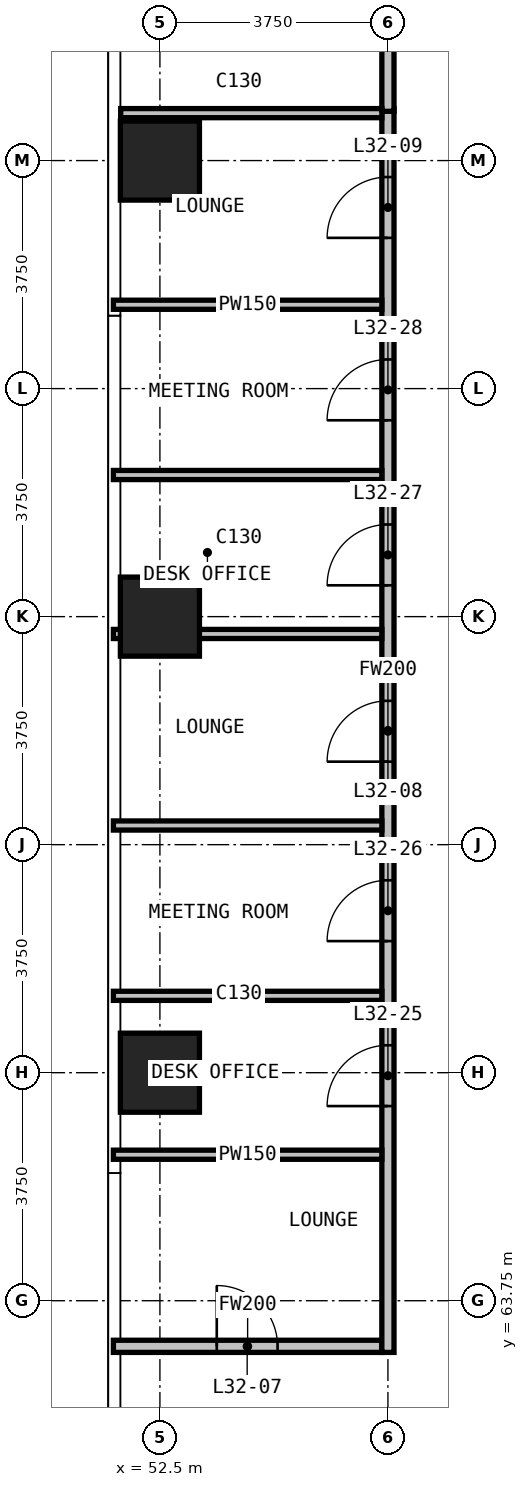
"""IFC4 building model, lengths in metres.
Left out: names, types, materials, properties, quantities, classifications, styles, units other than length and angle.
Written with IfcOpenShell. Run it as: python <this file> out.ifc"""

import sys

from ifc_helpers import new_model, si_unit, direction, frame, frame_2d, origin, origin_2d, place, context, subcontext, project, spatial, rectangle, extrude, element, fill, save


model = new_model("IFC4")
c1 = context("Model", 3, precision=1e-05, world=origin(), true_north=direction((0.0, 1.0)))
c2 = subcontext(c1, "Body", "Model", "MODEL_VIEW")
j1 = project(units=[si_unit("LENGTHUNIT", "METRE"), si_unit("PLANEANGLEUNIT", "RADIAN")], contexts=[c1])
p1 = place(None, origin())
s1 = spatial("IfcSite", under=j1, at=p1, CompositionType="ELEMENT")
p2 = place(p1, origin())
s2 = spatial("IfcBuilding", under=s1, at=p2, CompositionType="ELEMENT")
p3 = place(p2, frame((0.0, 0.0, 128.8)))
s3 = spatial("IfcBuildingStorey", under=s2, at=p3, CompositionType="ELEMENT", Elevation=128.8)
for number, where, z_axis, x_axis in (
    (1, (52.5, 67.5, 0.0), (0.0, 0.0, 1.0), (1.0, 0.0, 0.0)),
    (2, (52.5, 75.0, 0.0), (0.0, 0.0, 1.0), (1.0, 0.0, 0.0)),
    (3, (52.5, 82.5, 0.0), (0.0, 0.0, 1.0), (1.0, 0.0, 0.0)),
):
    element("IfcColumn", number, at=place(p3, frame(where, z_axis=z_axis, x_axis=x_axis)), inside=s3, PredefinedType="COLUMN", context=c2, shape_type="SweptSolid", body=[
        extrude(rectangle(XDim=1.3, YDim=1.3, at=origin_2d()), origin(), (0.0, 0.0, 1.0), 3.6),
    ])
p4 = place(p3, frame((51.735, 63.0, 0.0), z_axis=(0.0, 0.0, 1.0), x_axis=(1.0, 0.0, 0.0)))
e4 = element("IfcWall", 4, at=p4, inside=s3, PredefinedType="PARTITIONING", context=c2, shape_type="SweptSolid", body=[
    extrude(rectangle(XDim=4.415, YDim=0.2, at=frame_2d((2.208, 0.0))), origin(), (0.0, 0.0, 1.0), 3.3),
])
p5 = place(p4, frame((1.7, 0.0, 0.0)))
e5 = element("IfcOpeningElement", 5, at=p5, cuts=e4, PredefinedType="OPENING", context=c2, shape_type="SweptSolid", body=[
    extrude(rectangle(XDim=1.0, YDim=2.2, at=frame_2d((0.5, 1.1))), frame((0.0, 0.11, 0.0), z_axis=(0.0, -1.0, 0.0), x_axis=(1.0, 0.0, 0.0)), (0.0, 0.0, 1.0), 0.22),
])
p6 = place(p3, frame((56.25, 62.9, 0.0), z_axis=(0.0, 0.0, 1.0), x_axis=(0.0, 1.0, 0.0)))
e6 = element("IfcWall", 6, at=p6, inside=s3, PredefinedType="PARTITIONING", context=c2, shape_type="SweptSolid", body=[
    extrude(rectangle(XDim=20.455, YDim=0.2, at=frame_2d((10.228, 0.0))), origin(), (0.0, 0.0, 1.0), 3.3),
])
p7 = place(p6, frame((9.715, 0.0, 0.0)))
e7 = element("IfcOpeningElement", 7, at=p7, cuts=e6, PredefinedType="OPENING", context=c2, shape_type="SweptSolid", body=[
    extrude(rectangle(XDim=1.0, YDim=2.2, at=frame_2d((0.5, 1.1))), frame((0.0, 0.11, 0.0), z_axis=(0.0, -1.0, 0.0), x_axis=(1.0, 0.0, 0.0)), (0.0, 0.0, 1.0), 0.22),
])
p8 = place(p6, frame((18.329, 0.0, 0.0)))
e8 = element("IfcOpeningElement", 8, at=p8, cuts=e6, PredefinedType="OPENING", context=c2, shape_type="SweptSolid", body=[
    extrude(rectangle(XDim=1.0, YDim=2.2, at=frame_2d((0.5, 1.1))), frame((0.0, 0.11, 0.0), z_axis=(0.0, -1.0, 0.0), x_axis=(1.0, 0.0, 0.0)), (0.0, 0.0, 1.0), 0.22),
])
p9 = place(p6, frame((4.051, 0.0, 0.0)))
e9 = element("IfcOpeningElement", 9, at=p9, cuts=e6, PredefinedType="OPENING", context=c2, shape_type="SweptSolid", body=[
    extrude(rectangle(XDim=1.0, YDim=2.2, at=frame_2d((0.5, 1.1))), frame((0.0, 0.11, 0.0), z_axis=(0.0, -1.0, 0.0), x_axis=(1.0, 0.0, 0.0)), (0.0, 0.0, 1.0), 0.22),
])
p10 = place(p6, frame((6.764, 0.0, 0.0)))
e10 = element("IfcOpeningElement", 10, at=p10, cuts=e6, PredefinedType="OPENING", context=c2, shape_type="SweptSolid", body=[
    extrude(rectangle(XDim=1.0, YDim=2.2, at=frame_2d((0.5, 1.1))), frame((0.0, 0.11, 0.0), z_axis=(0.0, -1.0, 0.0), x_axis=(1.0, 0.0, 0.0)), (0.0, 0.0, 1.0), 0.22),
])
p11 = place(p6, frame((12.615, 0.0, 0.0)))
e11 = element("IfcOpeningElement", 11, at=p11, cuts=e6, PredefinedType="OPENING", context=c2, shape_type="SweptSolid", body=[
    extrude(rectangle(XDim=1.0, YDim=2.2, at=frame_2d((0.5, 1.1))), frame((0.0, 0.11, 0.0), z_axis=(0.0, -1.0, 0.0), x_axis=(1.0, 0.0, 0.0)), (0.0, 0.0, 1.0), 0.22),
])
p12 = place(p6, frame((15.329, 0.0, 0.0)))
e12 = element("IfcOpeningElement", 12, at=p12, cuts=e6, PredefinedType="OPENING", context=c2, shape_type="SweptSolid", body=[
    extrude(rectangle(XDim=1.0, YDim=2.2, at=frame_2d((0.5, 1.1))), frame((0.0, 0.11, 0.0), z_axis=(0.0, -1.0, 0.0), x_axis=(1.0, 0.0, 0.0)), (0.0, 0.0, 1.0), 0.22),
])
p13 = place(p3, frame((56.25, 83.31, 0.0), z_axis=(0.0, 0.0, 1.0), x_axis=(0.0, 1.0, 0.0)))
e13 = element("IfcWall", 13, at=p13, inside=s3, PredefinedType="PARTITIONING", context=c2, shape_type="SweptSolid", body=[
    extrude(rectangle(XDim=7.335, YDim=0.2, at=frame_2d((3.667, 0.0))), origin(), (0.0, 0.0, 1.0), 3.3),
])
for number, where, z_axis, x_axis in (
    (14, (51.735, 66.151, 0.0), (0.0, 0.0, 1.0), (1.0, 0.0, 0.0)),
    (15, (51.735, 68.764, 0.0), (0.0, 0.0, 1.0), (1.0, 0.0, 0.0)),
    (16, (51.735, 71.565, 0.0), (0.0, 0.0, 1.0), (1.0, 0.0, 0.0)),
    (17, (51.735, 74.715, 0.0), (0.0, 0.0, 1.0), (1.0, 0.0, 0.0)),
    (18, (51.735, 77.329, 0.0), (0.0, 0.0, 1.0), (1.0, 0.0, 0.0)),
    (19, (51.735, 80.129, 0.0), (0.0, 0.0, 1.0), (1.0, 0.0, 0.0)),
):
    element("IfcWall", number, at=place(p3, frame(where, z_axis=z_axis, x_axis=x_axis)), inside=s3, PredefinedType="PARTITIONING", context=c2, shape_type="SweptSolid", body=[
        extrude(rectangle(XDim=4.415, YDim=0.15, at=frame_2d((2.208, 0.0))), origin(), (0.0, 0.0, 1.0), 3.3),
    ])
p14 = place(p3, frame((51.855, 83.28, 0.0), z_axis=(0.0, 0.0, 1.0), x_axis=(1.0, 0.0, 0.0)))
e20 = element("IfcWall", 20, at=p14, inside=s3, PredefinedType="PARTITIONING", context=c2, shape_type="SweptSolid", body=[
    extrude(rectangle(XDim=4.295, YDim=0.15, at=frame_2d((2.147, 0.0))), origin(), (0.0, 0.0, 1.0), 3.3),
])
p15 = place(p5, origin())
e21 = element("IfcDoor", 21, at=p15, inside=s3, OperationType="SINGLE_SWING_RIGHT", PredefinedType="DOOR", context=c2, shape_type="SweptSolid", body=[
    extrude(rectangle(XDim=1.0, YDim=2.2, at=frame_2d((0.5, 1.1))), frame((0.0, 0.025, 0.0), z_axis=(0.0, -1.0, 0.0), x_axis=(1.0, 0.0, 0.0)), (0.0, 0.0, 1.0), 0.05),
])
fill(e5, e21)
p16 = place(p7, origin())
e22 = element("IfcDoor", 22, at=p16, inside=s3, OperationType="SINGLE_SWING_LEFT", PredefinedType="DOOR", context=c2, shape_type="SweptSolid", body=[
    extrude(rectangle(XDim=1.0, YDim=2.2, at=frame_2d((0.5, 1.1))), frame((0.0, 0.025, 0.0), z_axis=(0.0, -1.0, 0.0), x_axis=(1.0, 0.0, 0.0)), (0.0, 0.0, 1.0), 0.05),
])
fill(e7, e22)
p17 = place(p8, origin())
e23 = element("IfcDoor", 23, at=p17, inside=s3, OperationType="SINGLE_SWING_LEFT", PredefinedType="DOOR", context=c2, shape_type="SweptSolid", body=[
    extrude(rectangle(XDim=1.0, YDim=2.2, at=frame_2d((0.5, 1.1))), frame((0.0, 0.025, 0.0), z_axis=(0.0, -1.0, 0.0), x_axis=(1.0, 0.0, 0.0)), (0.0, 0.0, 1.0), 0.05),
])
fill(e8, e23)
p18 = place(p9, origin())
e24 = element("IfcDoor", 24, at=p18, inside=s3, OperationType="SINGLE_SWING_LEFT", PredefinedType="DOOR", context=c2, shape_type="SweptSolid", body=[
    extrude(rectangle(XDim=1.0, YDim=2.2, at=frame_2d((0.5, 1.1))), frame((0.0, 0.025, 0.0), z_axis=(0.0, -1.0, 0.0), x_axis=(1.0, 0.0, 0.0)), (0.0, 0.0, 1.0), 0.05),
])
fill(e9, e24)
p19 = place(p10, origin())
e25 = element("IfcDoor", 25, at=p19, inside=s3, OperationType="SINGLE_SWING_LEFT", PredefinedType="DOOR", context=c2, shape_type="SweptSolid", body=[
    extrude(rectangle(XDim=1.0, YDim=2.2, at=frame_2d((0.5, 1.1))), frame((0.0, 0.025, 0.0), z_axis=(0.0, -1.0, 0.0), x_axis=(1.0, 0.0, 0.0)), (0.0, 0.0, 1.0), 0.05),
])
fill(e10, e25)
p20 = place(p11, origin())
e26 = element("IfcDoor", 26, at=p20, inside=s3, OperationType="SINGLE_SWING_LEFT", PredefinedType="DOOR", context=c2, shape_type="SweptSolid", body=[
    extrude(rectangle(XDim=1.0, YDim=2.2, at=frame_2d((0.5, 1.1))), frame((0.0, 0.025, 0.0), z_axis=(0.0, -1.0, 0.0), x_axis=(1.0, 0.0, 0.0)), (0.0, 0.0, 1.0), 0.05),
])
fill(e11, e26)
p21 = place(p12, origin())
e27 = element("IfcDoor", 27, at=p21, inside=s3, OperationType="SINGLE_SWING_LEFT", PredefinedType="DOOR", context=c2, shape_type="SweptSolid", body=[
    extrude(rectangle(XDim=1.0, YDim=2.2, at=frame_2d((0.5, 1.1))), frame((0.0, 0.025, 0.0), z_axis=(0.0, -1.0, 0.0), x_axis=(1.0, 0.0, 0.0)), (0.0, 0.0, 1.0), 0.05),
])
fill(e12, e27)
save(model, sys.argv[1])
